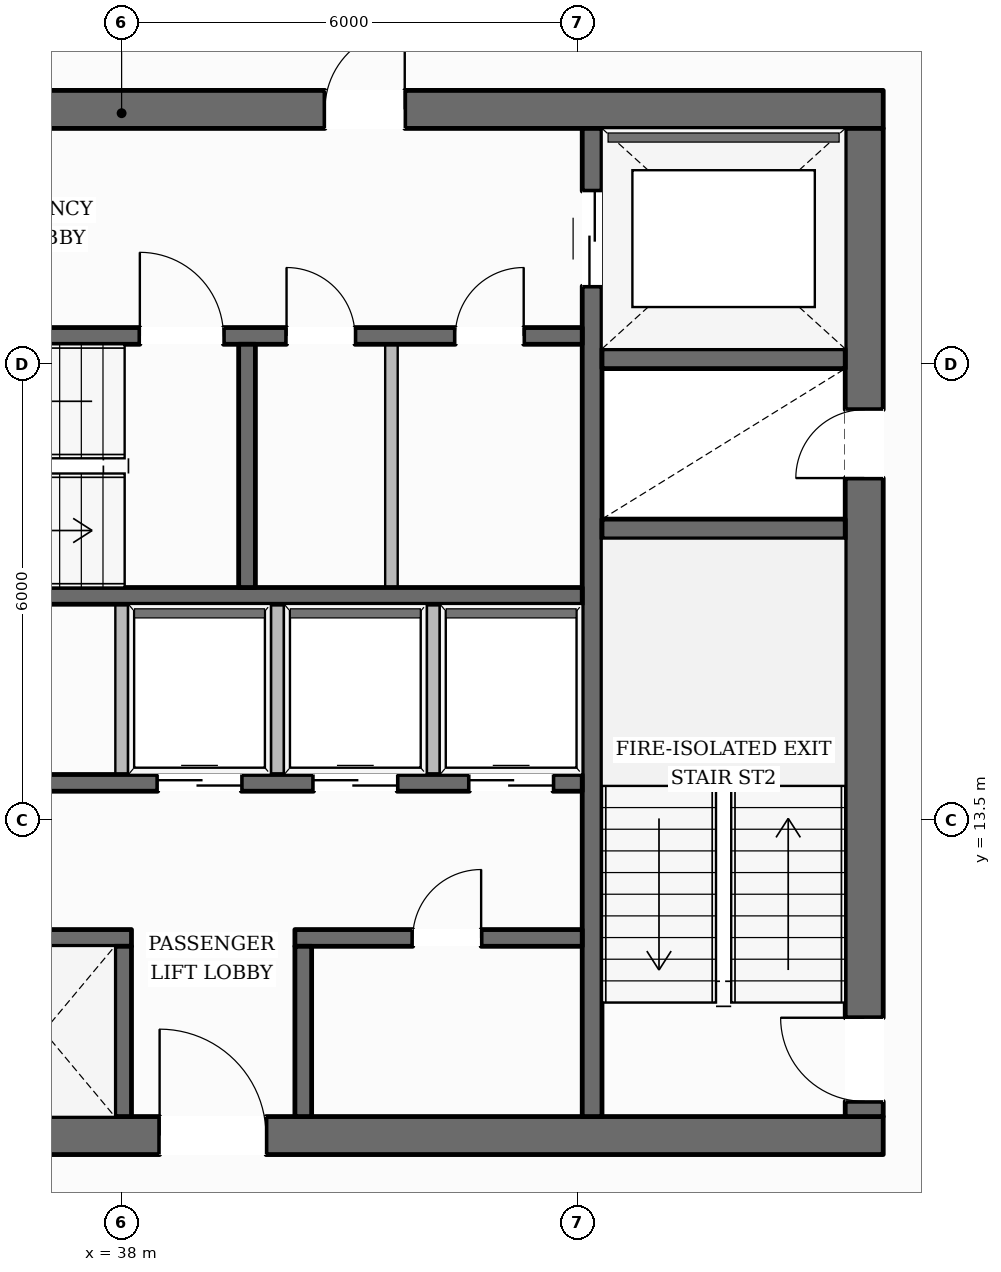
"""IFC4 building model, lengths in metres.
Left out: names, types, materials, properties, quantities, classifications, styles, units other than length and angle.
Written with IfcOpenShell. Run it as: python <this file> out.ifc"""

import sys

from ifc_helpers import new_model, si_unit, direction, frame, frame_2d, origin, place, context, subcontext, project, spatial, rectangle, extrude, element, fill, save


model = new_model("IFC4")
c1 = context("Model", 3, precision=1e-05, world=origin(), true_north=direction((0.0, 1.0)))
c2 = subcontext(c1, "Body", "Model", "MODEL_VIEW")
j1 = project(units=[si_unit("LENGTHUNIT", "METRE"), si_unit("PLANEANGLEUNIT", "RADIAN")], contexts=[c1])
p1 = place(None, origin())
s1 = spatial("IfcSite", under=j1, at=p1, CompositionType="ELEMENT")
p2 = place(p1, origin())
s2 = spatial("IfcBuilding", under=s1, at=p2, CompositionType="ELEMENT")
p3 = place(p2, frame((0.0, 0.0, 104.75)))
s3 = spatial("IfcBuildingStorey", under=s2, at=p3, CompositionType="ELEMENT", Elevation=104.75)
p4 = place(p3, frame((27.98, 9.35, 0.0), z_axis=(0.0, 0.0, 1.0), x_axis=(1.0, 0.0, 0.0)))
e1 = element("IfcWall", 1, at=p4, inside=s3, PredefinedType="SOLIDWALL", context=c2, shape_type="SweptSolid", body=[
    extrude(rectangle(XDim=20.04, YDim=0.5, at=frame_2d((10.02, 0.0))), origin(), (0.0, 0.0, 1.0), 3.6),
])
p5 = place(p4, frame((10.52, 0.0, 0.0)))
e2 = element("IfcOpeningElement", 2, at=p5, cuts=e1, PredefinedType="OPENING", context=c2, shape_type="SweptSolid", body=[
    extrude(rectangle(XDim=1.4, YDim=2.2, at=frame_2d((0.7, 1.1))), frame((0.0, 0.26, 0.0), z_axis=(0.0, -1.0, 0.0), x_axis=(1.0, 0.0, 0.0)), (0.0, 0.0, 1.0), 0.52),
])
p6 = place(p3, frame((27.98, 22.85, 0.0), z_axis=(0.0, 0.0, 1.0), x_axis=(1.0, 0.0, 0.0)))
e3 = element("IfcWall", 3, at=p6, inside=s3, PredefinedType="SOLIDWALL", context=c2, shape_type="SweptSolid", body=[
    extrude(rectangle(XDim=20.04, YDim=0.5, at=frame_2d((10.02, 0.0))), origin(), (0.0, 0.0, 1.0), 3.6),
])
p7 = place(p6, frame((6.295, 0.0, 0.0)))
e4 = element("IfcOpeningElement", 4, at=p7, cuts=e3, PredefinedType="OPENING", context=c2, shape_type="SweptSolid", body=[
    extrude(rectangle(XDim=1.05, YDim=2.15, at=frame_2d((0.525, 1.075))), frame((0.0, 0.26, 0.0), z_axis=(0.0, -1.0, 0.0), x_axis=(1.0, 0.0, 0.0)), (0.0, 0.0, 1.0), 0.52),
])
p8 = place(p6, frame((12.695, 0.0, 0.0)))
e5 = element("IfcOpeningElement", 5, at=p8, cuts=e3, PredefinedType="OPENING", context=c2, shape_type="SweptSolid", body=[
    extrude(rectangle(XDim=1.05, YDim=2.15, at=frame_2d((0.525, 1.075))), frame((0.0, 0.26, 0.0), z_axis=(0.0, -1.0, 0.0), x_axis=(1.0, 0.0, 0.0)), (0.0, 0.0, 1.0), 0.52),
])
p9 = place(p3, frame((47.77, 9.6, 0.0), z_axis=(0.0, 0.0, 1.0), x_axis=(0.0, 1.0, 0.0)))
e6 = element("IfcWall", 6, at=p9, inside=s3, PredefinedType="SOLIDWALL", context=c2, shape_type="SweptSolid", body=[
    extrude(rectangle(XDim=13.0, YDim=0.5, at=frame_2d((6.5, 0.0))), origin(), (0.0, 0.0, 1.0), 3.6),
])
p10 = place(p9, frame((0.2, 0.0, 0.0)))
e7 = element("IfcOpeningElement", 7, at=p10, cuts=e6, PredefinedType="OPENING", context=c2, shape_type="SweptSolid", body=[
    extrude(rectangle(XDim=1.1, YDim=2.15, at=frame_2d((0.55, 1.075))), frame((0.0, 0.26, 0.0), z_axis=(0.0, -1.0, 0.0), x_axis=(1.0, 0.0, 0.0)), (0.0, 0.0, 1.0), 0.52),
])
p11 = place(p9, frame((8.4, 0.0, 0.0)))
e8 = element("IfcOpeningElement", 8, at=p11, cuts=e6, PredefinedType="OPENING", context=c2, shape_type="SweptSolid", body=[
    extrude(rectangle(XDim=0.9, YDim=2.1, at=frame_2d((0.45, 1.05))), frame((0.0, 0.26, 0.0), z_axis=(0.0, -1.0, 0.0), x_axis=(1.0, 0.0, 0.0)), (0.0, 0.0, 1.0), 0.52),
])
p12 = place(p3, frame((44.19, 9.6, 0.0), z_axis=(0.0, 0.0, 1.0), x_axis=(0.0, 1.0, 0.0)))
e9 = element("IfcWall", 9, at=p12, inside=s3, PredefinedType="SHEAR", context=c2, shape_type="SweptSolid", body=[
    extrude(rectangle(XDim=13.0, YDim=0.26, at=frame_2d((6.5, 0.0))), origin(), (0.0, 0.0, 1.0), 3.6),
])
p13 = place(p12, frame((10.925, 0.0, 0.0)))
e10 = element("IfcOpeningElement", 10, at=p13, cuts=e9, PredefinedType="OPENING", context=c2, shape_type="SweptSolid", body=[
    extrude(rectangle(XDim=1.25, YDim=2.25, at=frame_2d((0.625, 1.125))), frame((0.0, 0.14, 0.0), z_axis=(0.0, -1.0, 0.0), x_axis=(1.0, 0.0, 0.0)), (0.0, 0.0, 1.0), 0.28),
])
for number, where, z_axis, x_axis in (
    (11, (44.32, 17.33, 0.0), (0.0, 0.0, 1.0), (1.0, 0.0, 0.0)),
    (12, (44.32, 19.57, 0.0), (0.0, 0.0, 1.0), (1.0, 0.0, 0.0)),
):
    element("IfcWall", number, at=place(p3, frame(where, z_axis=z_axis, x_axis=x_axis)), inside=s3, PredefinedType="SHEAR", context=c2, shape_type="SweptSolid", body=[
        extrude(rectangle(XDim=3.2, YDim=0.26, at=frame_2d((1.6, 0.0))), origin(), (0.0, 0.0, 1.0), 3.6),
    ])
p14 = place(p3, frame((31.94, 19.87, 0.0), z_axis=(0.0, 0.0, 1.0), x_axis=(1.0, 0.0, 0.0)))
e13 = element("IfcWall", 13, at=p14, inside=s3, PredefinedType="SOLIDWALL", context=c2, shape_type="SweptSolid", body=[
    extrude(rectangle(XDim=12.12, YDim=0.22, at=frame_2d((6.06, 0.0))), origin(), (0.0, 0.0, 1.0), 3.6),
])
p15 = place(p14, frame((6.3, 0.0, 0.0)))
e14 = element("IfcOpeningElement", 14, at=p15, cuts=e13, PredefinedType="OPENING", context=c2, shape_type="SweptSolid", body=[
    extrude(rectangle(XDim=1.1, YDim=2.15, at=frame_2d((0.55, 1.075))), frame((0.0, 0.12, 0.0), z_axis=(0.0, -1.0, 0.0), x_axis=(1.0, 0.0, 0.0)), (0.0, 0.0, 1.0), 0.24),
])
p16 = place(p14, frame((8.23, 0.0, 0.0)))
e15 = element("IfcOpeningElement", 15, at=p16, cuts=e13, PredefinedType="OPENING", context=c2, shape_type="SweptSolid", body=[
    extrude(rectangle(XDim=0.9, YDim=2.1, at=frame_2d((0.45, 1.05))), frame((0.0, 0.12, 0.0), z_axis=(0.0, -1.0, 0.0), x_axis=(1.0, 0.0, 0.0)), (0.0, 0.0, 1.0), 0.24),
])
p17 = place(p14, frame((10.45, 0.0, 0.0)))
e16 = element("IfcOpeningElement", 16, at=p17, cuts=e13, PredefinedType="OPENING", context=c2, shape_type="SweptSolid", body=[
    extrude(rectangle(XDim=0.9, YDim=2.1, at=frame_2d((0.45, 1.05))), frame((0.0, 0.12, 0.0), z_axis=(0.0, -1.0, 0.0), x_axis=(1.0, 0.0, 0.0)), (0.0, 0.0, 1.0), 0.24),
])
p18 = place(p3, frame((31.94, 16.45, 0.0), z_axis=(0.0, 0.0, 1.0), x_axis=(1.0, 0.0, 0.0)))
e17 = element("IfcWall", 17, at=p18, inside=s3, PredefinedType="SOLIDWALL", context=c2, shape_type="SweptSolid", body=[
    extrude(rectangle(XDim=12.12, YDim=0.22, at=frame_2d((6.06, 0.0))), origin(), (0.0, 0.0, 1.0), 3.6),
])
p19 = place(p3, frame((39.65, 16.56, 0.0), z_axis=(0.0, 0.0, 1.0), x_axis=(0.0, 1.0, 0.0)))
e18 = element("IfcWall", 18, at=p19, inside=s3, PredefinedType="SOLIDWALL", context=c2, shape_type="SweptSolid", body=[
    extrude(rectangle(XDim=3.2, YDim=0.22, at=frame_2d((1.6, 0.0))), origin(), (0.0, 0.0, 1.0), 3.6),
])
p20 = place(p3, frame((31.94, 13.99, 0.0), z_axis=(0.0, 0.0, 1.0), x_axis=(1.0, 0.0, 0.0)))
e19 = element("IfcWall", 19, at=p20, inside=s3, PredefinedType="SOLIDWALL", context=c2, shape_type="SweptSolid", body=[
    extrude(rectangle(XDim=12.12, YDim=0.22, at=frame_2d((6.06, 0.0))), origin(), (0.0, 0.0, 1.0), 3.6),
])
p21 = place(p20, frame((2.51, 0.0, 0.0)))
e20 = element("IfcOpeningElement", 20, at=p21, cuts=e19, PredefinedType="OPENING", context=c2, shape_type="SweptSolid", body=[
    extrude(rectangle(XDim=0.9, YDim=2.1, at=frame_2d((0.45, 1.05))), frame((0.0, 0.12, 0.0), z_axis=(0.0, -1.0, 0.0), x_axis=(1.0, 0.0, 0.0)), (0.0, 0.0, 1.0), 0.24),
])
p22 = place(p20, frame((6.535, 0.0, 0.0)))
e21 = element("IfcOpeningElement", 21, at=p22, cuts=e19, PredefinedType="OPENING", context=c2, shape_type="SweptSolid", body=[
    extrude(rectangle(XDim=1.1, YDim=2.2, at=frame_2d((0.55, 1.1))), frame((0.0, 0.12, 0.0), z_axis=(0.0, -1.0, 0.0), x_axis=(1.0, 0.0, 0.0)), (0.0, 0.0, 1.0), 0.24),
])
p23 = place(p20, frame((8.585, 0.0, 0.0)))
e22 = element("IfcOpeningElement", 22, at=p23, cuts=e19, PredefinedType="OPENING", context=c2, shape_type="SweptSolid", body=[
    extrude(rectangle(XDim=1.1, YDim=2.2, at=frame_2d((0.55, 1.1))), frame((0.0, 0.12, 0.0), z_axis=(0.0, -1.0, 0.0), x_axis=(1.0, 0.0, 0.0)), (0.0, 0.0, 1.0), 0.24),
])
p24 = place(p20, frame((10.635, 0.0, 0.0)))
e23 = element("IfcOpeningElement", 23, at=p24, cuts=e19, PredefinedType="OPENING", context=c2, shape_type="SweptSolid", body=[
    extrude(rectangle(XDim=1.1, YDim=2.2, at=frame_2d((0.55, 1.1))), frame((0.0, 0.12, 0.0), z_axis=(0.0, -1.0, 0.0), x_axis=(1.0, 0.0, 0.0)), (0.0, 0.0, 1.0), 0.24),
])
p25 = place(p3, frame((31.94, 11.95, 0.0), z_axis=(0.0, 0.0, 1.0), x_axis=(1.0, 0.0, 0.0)))
e24 = element("IfcWall", 24, at=p25, inside=s3, PredefinedType="SOLIDWALL", context=c2, shape_type="SweptSolid", body=[
    extrude(rectangle(XDim=6.19, YDim=0.22, at=frame_2d((3.095, 0.0))), origin(), (0.0, 0.0, 1.0), 3.6),
])
p26 = place(p3, frame((40.28, 11.95, 0.0), z_axis=(0.0, 0.0, 1.0), x_axis=(1.0, 0.0, 0.0)))
e25 = element("IfcWall", 25, at=p26, inside=s3, PredefinedType="SOLIDWALL", context=c2, shape_type="SweptSolid", body=[
    extrude(rectangle(XDim=3.78, YDim=0.22, at=frame_2d((1.89, 0.0))), origin(), (0.0, 0.0, 1.0), 3.6),
])
p27 = place(p26, frame((1.55, 0.0, 0.0)))
e26 = element("IfcOpeningElement", 26, at=p27, cuts=e25, PredefinedType="OPENING", context=c2, shape_type="SweptSolid", body=[
    extrude(rectangle(XDim=0.9, YDim=2.1, at=frame_2d((0.45, 1.05))), frame((0.0, 0.12, 0.0), z_axis=(0.0, -1.0, 0.0), x_axis=(1.0, 0.0, 0.0)), (0.0, 0.0, 1.0), 0.24),
])
for number, where, z_axis, x_axis in (
    (27, (38.02, 9.6, 0.0), (0.0, 0.0, 1.0), (0.0, 1.0, 0.0)),
    (28, (40.39, 9.6, 0.0), (0.0, 0.0, 1.0), (0.0, 1.0, 0.0)),
):
    element("IfcWall", number, at=place(p3, frame(where, z_axis=z_axis, x_axis=x_axis)), inside=s3, PredefinedType="SOLIDWALL", context=c2, shape_type="SweptSolid", body=[
        extrude(rectangle(XDim=2.24, YDim=0.22, at=frame_2d((1.12, 0.0))), origin(), (0.0, 0.0, 1.0), 3.6),
    ])
p28 = place(p3, frame((44.12, 44.689, 0.0), z_axis=(0.0, 0.0, 1.0), x_axis=(0.498376840975, -0.866960509124, 0.0)))
e29 = element("IfcWall", 29, at=p28, inside=s3, PredefinedType="STANDARD", context=c2, shape_type="SweptSolid", body=[
    extrude(rectangle(XDim=36.441, YDim=0.38, at=frame_2d((18.22, 0.0))), origin(), (0.0, 0.0, 1.0), 3.059),
])
p29 = place(p28, frame((32.234, 0.0, 0.65)))
e30 = element("IfcOpeningElement", 30, at=p29, cuts=e29, PredefinedType="OPENING", context=c2, shape_type="SweptSolid", body=[
    extrude(rectangle(XDim=1.55, YDim=1.75, at=frame_2d((0.775, 0.875))), frame((0.0, 0.2, 0.0), z_axis=(0.0, -1.0, 0.0), x_axis=(1.0, 0.0, 0.0)), (0.0, 0.0, 1.0), 0.4),
])
p30 = place(p28, frame((26.319, 0.0, 0.65)))
e31 = element("IfcOpeningElement", 31, at=p30, cuts=e29, PredefinedType="OPENING", context=c2, shape_type="SweptSolid", body=[
    extrude(rectangle(XDim=1.55, YDim=1.75, at=frame_2d((0.775, 0.875))), frame((0.0, 0.2, 0.0), z_axis=(0.0, -1.0, 0.0), x_axis=(1.0, 0.0, 0.0)), (0.0, 0.0, 1.0), 0.4),
])
p31 = place(p28, frame((14.489, 0.0, 0.65)))
e32 = element("IfcOpeningElement", 32, at=p31, cuts=e29, PredefinedType="OPENING", context=c2, shape_type="SweptSolid", body=[
    extrude(rectangle(XDim=1.55, YDim=1.75, at=frame_2d((0.775, 0.875))), frame((0.0, 0.2, 0.0), z_axis=(0.0, -1.0, 0.0), x_axis=(1.0, 0.0, 0.0)), (0.0, 0.0, 1.0), 0.4),
])
p32 = place(p28, frame((8.573, 0.0, 0.65)))
e33 = element("IfcOpeningElement", 33, at=p32, cuts=e29, PredefinedType="OPENING", context=c2, shape_type="SweptSolid", body=[
    extrude(rectangle(XDim=1.55, YDim=1.75, at=frame_2d((0.775, 0.875))), frame((0.0, 0.2, 0.0), z_axis=(0.0, -1.0, 0.0), x_axis=(1.0, 0.0, 0.0)), (0.0, 0.0, 1.0), 0.4),
])
p33 = place(p28, frame((2.658, 0.0, 0.65)))
e34 = element("IfcOpeningElement", 34, at=p33, cuts=e29, PredefinedType="OPENING", context=c2, shape_type="SweptSolid", body=[
    extrude(rectangle(XDim=1.55, YDim=1.75, at=frame_2d((0.775, 0.875))), frame((0.0, 0.2, 0.0), z_axis=(0.0, -1.0, 0.0), x_axis=(1.0, 0.0, 0.0)), (0.0, 0.0, 1.0), 0.4),
])
for number, where, z_axis, x_axis in (
    (35, (38.0, 14.1, 0.0), (0.0, 0.0, 1.0), (0.0, 1.0, 0.0)),
    (36, (40.05, 14.1, 0.0), (0.0, 0.0, 1.0), (0.0, 1.0, 0.0)),
    (37, (42.1, 14.1, 0.0), (0.0, 0.0, 1.0), (0.0, 1.0, 0.0)),
):
    element("IfcWall", number, at=place(p3, frame(where, z_axis=z_axis, x_axis=x_axis)), inside=s3, PredefinedType="PARTITIONING", context=c2, shape_type="SweptSolid", body=[
        extrude(rectangle(XDim=2.24, YDim=0.165, at=frame_2d((1.12, 0.0))), origin(), (0.0, 0.0, 1.0), 3.6),
    ])
p34 = place(p3, frame((41.55, 16.56, 0.0), z_axis=(0.0, 0.0, 1.0), x_axis=(0.0, 1.0, 0.0)))
e38 = element("IfcWall", 38, at=p34, inside=s3, PredefinedType="PARTITIONING", context=c2, shape_type="SweptSolid", body=[
    extrude(rectangle(XDim=3.2, YDim=0.165, at=frame_2d((1.6, 0.0))), origin(), (0.0, 0.0, 1.0), 3.6),
])
p35 = place(p10, origin())
e39 = element("IfcDoor", 39, at=p35, inside=s3, OperationType="SINGLE_SWING_RIGHT", PredefinedType="DOOR", context=c2, shape_type="SweptSolid", body=[
    extrude(rectangle(XDim=1.1, YDim=2.15, at=frame_2d((0.55, 1.075))), frame((0.0, 0.025, 0.0), z_axis=(0.0, -1.0, 0.0), x_axis=(1.0, 0.0, 0.0)), (0.0, 0.0, 1.0), 0.05),
])
fill(e7, e39)
p36 = place(p15, origin())
e40 = element("IfcDoor", 40, at=p36, inside=s3, OperationType="SINGLE_SWING_LEFT", PredefinedType="DOOR", context=c2, shape_type="SweptSolid", body=[
    extrude(rectangle(XDim=1.1, YDim=2.15, at=frame_2d((0.55, 1.075))), frame((0.0, 0.025, 0.0), z_axis=(0.0, -1.0, 0.0), x_axis=(1.0, 0.0, 0.0)), (0.0, 0.0, 1.0), 0.05),
])
fill(e14, e40)
p37 = place(p11, origin())
e41 = element("IfcDoor", 41, at=p37, inside=s3, OperationType="SINGLE_SWING_LEFT", PredefinedType="DOOR", context=c2, shape_type="SweptSolid", body=[
    extrude(rectangle(XDim=0.9, YDim=2.1, at=frame_2d((0.45, 1.05))), frame((0.0, 0.025, 0.0), z_axis=(0.0, -1.0, 0.0), x_axis=(1.0, 0.0, 0.0)), (0.0, 0.0, 1.0), 0.05),
])
fill(e8, e41)
p38 = place(p8, origin())
e42 = element("IfcDoor", 42, at=p38, inside=s3, OperationType="SINGLE_SWING_RIGHT", PredefinedType="DOOR", context=c2, shape_type="SweptSolid", body=[
    extrude(rectangle(XDim=1.05, YDim=2.15, at=frame_2d((0.525, 1.075))), frame((0.0, 0.025, 0.0), z_axis=(0.0, -1.0, 0.0), x_axis=(1.0, 0.0, 0.0)), (0.0, 0.0, 1.0), 0.05),
])
fill(e5, e42)
p39 = place(p13, origin())
e43 = element("IfcDoor", 43, at=p39, inside=s3, OperationType="DOUBLE_DOOR_SLIDING", PredefinedType="DOOR", context=c2, shape_type="SweptSolid", body=[
    extrude(rectangle(XDim=1.25, YDim=2.25, at=frame_2d((0.625, 1.125))), frame((0.0, 0.025, 0.0), z_axis=(0.0, -1.0, 0.0), x_axis=(1.0, 0.0, 0.0)), (0.0, 0.0, 1.0), 0.05),
])
fill(e10, e43)
p40 = place(p5, origin())
e44 = element("IfcDoor", 44, at=p40, inside=s3, OperationType="SINGLE_SWING_LEFT", PredefinedType="DOOR", context=c2, shape_type="SweptSolid", body=[
    extrude(rectangle(XDim=1.4, YDim=2.2, at=frame_2d((0.7, 1.1))), frame((0.0, 0.025, 0.0), z_axis=(0.0, -1.0, 0.0), x_axis=(1.0, 0.0, 0.0)), (0.0, 0.0, 1.0), 0.05),
])
fill(e2, e44)
p41 = place(p22, origin())
e45 = element("IfcDoor", 45, at=p41, inside=s3, OperationType="DOUBLE_DOOR_SLIDING", PredefinedType="DOOR", context=c2, shape_type="SweptSolid", body=[
    extrude(rectangle(XDim=1.1, YDim=2.2, at=frame_2d((0.55, 1.1))), frame((0.0, 0.025, 0.0), z_axis=(0.0, -1.0, 0.0), x_axis=(1.0, 0.0, 0.0)), (0.0, 0.0, 1.0), 0.05),
])
fill(e21, e45)
p42 = place(p23, origin())
e46 = element("IfcDoor", 46, at=p42, inside=s3, OperationType="DOUBLE_DOOR_SLIDING", PredefinedType="DOOR", context=c2, shape_type="SweptSolid", body=[
    extrude(rectangle(XDim=1.1, YDim=2.2, at=frame_2d((0.55, 1.1))), frame((0.0, 0.025, 0.0), z_axis=(0.0, -1.0, 0.0), x_axis=(1.0, 0.0, 0.0)), (0.0, 0.0, 1.0), 0.05),
])
fill(e22, e46)
p43 = place(p24, origin())
e47 = element("IfcDoor", 47, at=p43, inside=s3, OperationType="DOUBLE_DOOR_SLIDING", PredefinedType="DOOR", context=c2, shape_type="SweptSolid", body=[
    extrude(rectangle(XDim=1.1, YDim=2.2, at=frame_2d((0.55, 1.1))), frame((0.0, 0.025, 0.0), z_axis=(0.0, -1.0, 0.0), x_axis=(1.0, 0.0, 0.0)), (0.0, 0.0, 1.0), 0.05),
])
fill(e23, e47)
p44 = place(p16, origin())
e48 = element("IfcDoor", 48, at=p44, inside=s3, OperationType="SINGLE_SWING_LEFT", PredefinedType="DOOR", context=c2, shape_type="SweptSolid", body=[
    extrude(rectangle(XDim=0.9, YDim=2.1, at=frame_2d((0.45, 1.05))), frame((0.0, 0.025, 0.0), z_axis=(0.0, -1.0, 0.0), x_axis=(1.0, 0.0, 0.0)), (0.0, 0.0, 1.0), 0.05),
])
fill(e15, e48)
p45 = place(p17, origin())
e49 = element("IfcDoor", 49, at=p45, inside=s3, OperationType="SINGLE_SWING_RIGHT", PredefinedType="DOOR", context=c2, shape_type="SweptSolid", body=[
    extrude(rectangle(XDim=0.9, YDim=2.1, at=frame_2d((0.45, 1.05))), frame((0.0, 0.025, 0.0), z_axis=(0.0, -1.0, 0.0), x_axis=(1.0, 0.0, 0.0)), (0.0, 0.0, 1.0), 0.05),
])
fill(e16, e49)
p46 = place(p27, origin())
e50 = element("IfcDoor", 50, at=p46, inside=s3, OperationType="SINGLE_SWING_RIGHT", PredefinedType="DOOR", context=c2, shape_type="SweptSolid", body=[
    extrude(rectangle(XDim=0.9, YDim=2.1, at=frame_2d((0.45, 1.05))), frame((0.0, 0.025, 0.0), z_axis=(0.0, -1.0, 0.0), x_axis=(1.0, 0.0, 0.0)), (0.0, 0.0, 1.0), 0.05),
])
fill(e26, e50)
save(model, sys.argv[1])
